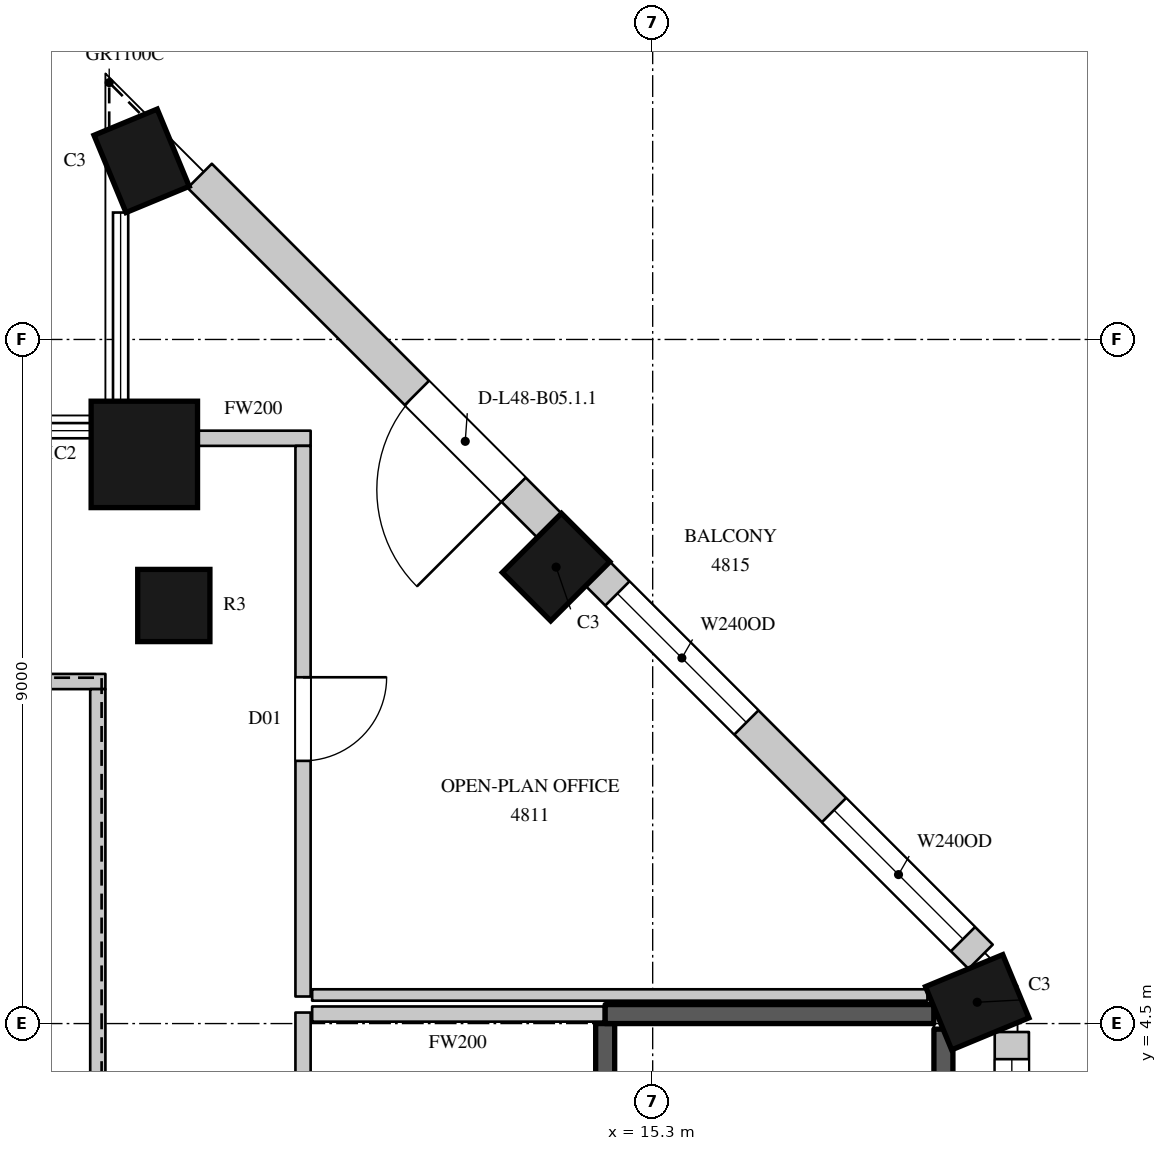
"""IFC4 building model, lengths in metres.
Left out: names, types, materials, properties, quantities, classifications, styles, units other than length and angle.
Written with IfcOpenShell. Run it as: python <this file> out.ifc"""

import sys

from ifc_helpers import new_model, si_unit, direction, frame, frame_2d, origin, origin_2d, place, context, subcontext, project, spatial, rectangle, circle, extrude, element, fill, save


model = new_model("IFC4")
c1 = context("Model", 3, precision=1e-05, world=origin(), true_north=direction((0.0, 1.0)))
c2 = subcontext(c1, "Body", "Model", "MODEL_VIEW")
j1 = project(units=[si_unit("LENGTHUNIT", "METRE"), si_unit("PLANEANGLEUNIT", "RADIAN")], contexts=[c1])
p1 = place(None, origin())
s1 = spatial("IfcSite", under=j1, at=p1, CompositionType="ELEMENT")
p2 = place(p1, origin())
s2 = spatial("IfcBuilding", under=s1, at=p2, CompositionType="ELEMENT")
p3 = place(p2, frame((0.0, 0.0, 217.9)))
s3 = spatial("IfcBuildingStorey", under=s2, at=p3, CompositionType="ELEMENT", Elevation=217.9)
for number, where, z_axis, x_axis in (
    (1, (19.57, 4.78, 0.0), (0.0, 0.0, 1.0), (-0.383, 0.924, 0.0)),
    (2, (14.029, 10.505, 0.0), (0.0, 0.0, 1.0), (-0.707, 0.707, 0.0)),
    (3, (8.576, 15.85, 0.0), (0.0, 0.0, 1.0), (-0.924, -0.383, 0.0)),
):
    element("IfcColumn", number, at=place(p3, frame(where, z_axis=z_axis, x_axis=x_axis)), inside=s3, PredefinedType="COLUMN", context=c2, shape_type="SweptSolid", body=[
        extrude(rectangle(XDim=0.9, YDim=1.1, at=origin_2d()), origin(), (0.0, 0.0, 1.0), 4.1),
    ])
p4 = place(p3, frame((8.612, 11.988, 0.0), z_axis=(0.0, 0.0, 1.0), x_axis=(1.0, 0.0, 0.0)))
e4 = element("IfcColumn", 4, at=p4, inside=s3, PredefinedType="COLUMN", context=c2, shape_type="SweptSolid", body=[
    extrude(circle(Radius=0.7, at=origin_2d()), origin(), (0.0, 0.0, 1.0), 4.1),
])
p5 = place(p3, frame((9.0, 10.0, 0.0), z_axis=(0.0, 0.0, 1.0), x_axis=(1.0, 0.0, 0.0)))
e5 = element("IfcColumn", 5, at=p5, inside=s3, PredefinedType="COLUMN", context=c2, shape_type="SweptSolid", body=[
    extrude(circle(Radius=0.475, at=origin_2d()), origin(), (0.0, 0.0, 1.0), 4.1),
])
p6 = place(p3, frame((20.025, -4.05, 0.0), z_axis=(0.0, 0.0, 1.0), x_axis=(0.0, 1.0, 0.0)))
e6 = element("IfcWall", 6, at=p6, inside=s3, PredefinedType="SOLIDWALL", context=c2, shape_type="SweptSolid", body=[
    extrude(rectangle(XDim=8.439, YDim=0.45, at=frame_2d((4.219, 0.0))), origin(), (0.0, 0.0, 1.0), 3.8),
])
p7 = place(p6, frame((0.394, 0.0, 1.05)))
e7 = element("IfcOpeningElement", 7, at=p7, cuts=e6, PredefinedType="OPENING", context=c2, shape_type="SweptSolid", body=[
    extrude(rectangle(XDim=3.0, YDim=2.4, at=frame_2d((1.5, 1.2))), frame((0.0, 0.235, 0.0), z_axis=(0.0, -1.0, 0.0), x_axis=(1.0, 0.0, 0.0)), (0.0, 0.0, 1.0), 0.47),
])
p8 = place(p6, frame((5.082, 0.0, 1.05)))
e8 = element("IfcOpeningElement", 8, at=p8, cuts=e6, PredefinedType="OPENING", context=c2, shape_type="SweptSolid", body=[
    extrude(rectangle(XDim=3.0, YDim=2.4, at=frame_2d((1.5, 1.2))), frame((0.0, 0.235, 0.0), z_axis=(0.0, -1.0, 0.0), x_axis=(1.0, 0.0, 0.0)), (0.0, 0.0, 1.0), 0.47),
])
p9 = place(p3, frame((19.615, 5.379, 0.0), z_axis=(0.0, 0.0, 1.0), x_axis=(-0.707089646058, 0.7071239159, 0.0)))
e9 = element("IfcWall", 9, at=p9, inside=s3, PredefinedType="SOLIDWALL", context=c2, shape_type="SweptSolid", body=[
    extrude(rectangle(XDim=7.124, YDim=0.45, at=frame_2d((3.562, 0.0))), origin(), (0.0, 0.0, 1.0), 3.8),
])
p10 = place(p9, frame((0.328, 0.0, 1.05)))
e10 = element("IfcOpeningElement", 10, at=p10, cuts=e9, PredefinedType="OPENING", context=c2, shape_type="SweptSolid", body=[
    extrude(rectangle(XDim=2.4, YDim=2.4, at=frame_2d((1.2, 1.2))), frame((0.0, 0.235, 0.0), z_axis=(0.0, -1.0, 0.0), x_axis=(1.0, 0.0, 0.0)), (0.0, 0.0, 1.0), 0.47),
])
p11 = place(p9, frame((4.359, 0.0, 1.05)))
e11 = element("IfcOpeningElement", 11, at=p11, cuts=e9, PredefinedType="OPENING", context=c2, shape_type="SweptSolid", body=[
    extrude(rectangle(XDim=2.4, YDim=2.4, at=frame_2d((1.2, 1.2))), frame((0.0, 0.235, 0.0), z_axis=(0.0, -1.0, 0.0), x_axis=(1.0, 0.0, 0.0)), (0.0, 0.0, 1.0), 0.47),
])
p12 = place(p3, frame((13.941, 11.053, 0.0), z_axis=(0.0, 0.0, 1.0), x_axis=(-0.707106781187, 0.707106781187, 0.0)))
e12 = element("IfcWall", 12, at=p12, inside=s3, PredefinedType="SOLIDWALL", context=c2, shape_type="SweptSolid", body=[
    extrude(rectangle(XDim=6.505, YDim=0.45, at=frame_2d((3.252, 0.0))), origin(), (0.0, 0.0, 1.0), 3.8),
])
p13 = place(p12, frame((0.665, 0.0, 0.0)))
e13 = element("IfcOpeningElement", 13, at=p13, cuts=e12, PredefinedType="OPENING", context=c2, shape_type="SweptSolid", body=[
    extrude(rectangle(XDim=1.8, YDim=2.4, at=frame_2d((0.9, 1.2))), frame((0.0, 0.235, 0.0), z_axis=(0.0, -1.0, 0.0), x_axis=(1.0, 0.0, 0.0)), (0.0, 0.0, 1.0), 0.47),
])
p14 = place(p3, frame((18.65, 7.864, 0.0), z_axis=(0.0, 0.0, 1.0), x_axis=(-0.707059037574, 0.707154521576, 0.0)))
e14 = element("IfcWall", 14, at=p14, inside=s3, PredefinedType="SOLIDWALL", context=c2, shape_type="SweptSolid", body=[
    extrude(rectangle(XDim=2.557, YDim=0.45, at=frame_2d((1.278, 0.0))), origin(), (0.0, 0.0, 1.0), 0.6),
])
p15 = place(p3, frame((-6.1, 9.0, 0.0), z_axis=(0.0, 0.0, 1.0), x_axis=(1.0, 0.0, 0.0)))
e15 = element("IfcWall", 15, at=p15, inside=s3, PredefinedType="PARTITIONING", context=c2, shape_type="SweptSolid", body=[
    extrude(rectangle(XDim=14.2, YDim=0.2, at=frame_2d((7.1, 0.0))), origin(), (0.0, 0.0, 1.0), 3.8),
])
p16 = place(p3, frame((8.0, -4.48, 0.0), z_axis=(0.0, 0.0, 1.0), x_axis=(0.0, 1.0, 0.0)))
e16 = element("IfcWall", 16, at=p16, inside=s3, PredefinedType="PARTITIONING", context=c2, shape_type="SweptSolid", body=[
    extrude(rectangle(XDim=13.38, YDim=0.2, at=frame_2d((6.69, 0.0))), origin(), (0.0, 0.0, 1.0), 3.8),
])
p17 = place(p3, frame((9.296, 12.2, 0.0), z_axis=(0.0, 0.0, 1.0), x_axis=(1.0, 0.0, 0.0)))
e17 = element("IfcWall", 17, at=p17, inside=s3, PredefinedType="PARTITIONING", context=c2, shape_type="SweptSolid", body=[
    extrude(rectangle(XDim=1.504, YDim=0.2, at=frame_2d((0.752, 0.0))), origin(), (0.0, 0.0, 1.0), 3.8),
])
p18 = place(p3, frame((10.7, -11.7, 0.0), z_axis=(0.0, 0.0, 1.0), x_axis=(0.0, 1.0, 0.0)))
e18 = element("IfcWall", 18, at=p18, inside=s3, PredefinedType="PARTITIONING", context=c2, shape_type="SweptSolid", body=[
    extrude(rectangle(XDim=16.345, YDim=0.2, at=frame_2d((8.172, 0.0))), origin(), (0.0, 0.0, 1.0), 3.8),
])
p19 = place(p18, frame((12.35, 0.0, 0.0)))
e19 = element("IfcOpeningElement", 19, at=p19, cuts=e18, PredefinedType="OPENING", context=c2, shape_type="SweptSolid", body=[
    extrude(rectangle(XDim=1.5, YDim=2.4, at=frame_2d((0.75, 1.2))), frame((0.0, 0.11, 0.0), z_axis=(0.0, -1.0, 0.0), x_axis=(1.0, 0.0, 0.0)), (0.0, 0.0, 1.0), 0.22),
])
p20 = place(p18, frame((3.0, 0.0, 0.0)))
e20 = element("IfcOpeningElement", 20, at=p20, cuts=e18, PredefinedType="OPENING", context=c2, shape_type="SweptSolid", body=[
    extrude(rectangle(XDim=1.1, YDim=2.4, at=frame_2d((0.55, 1.2))), frame((0.0, 0.11, 0.0), z_axis=(0.0, -1.0, 0.0), x_axis=(1.0, 0.0, 0.0)), (0.0, 0.0, 1.0), 0.22),
])
p21 = place(p3, frame((10.7, 4.856, 0.0), z_axis=(0.0, 0.0, 1.0), x_axis=(0.0, 1.0, 0.0)))
e21 = element("IfcWall", 21, at=p21, inside=s3, PredefinedType="PARTITIONING", context=c2, shape_type="SweptSolid", body=[
    extrude(rectangle(XDim=7.244, YDim=0.2, at=frame_2d((3.622, 0.0))), origin(), (0.0, 0.0, 1.0), 3.8),
])
p22 = place(p21, frame((3.1, 0.0, 0.0)))
e22 = element("IfcOpeningElement", 22, at=p22, cuts=e21, PredefinedType="OPENING", context=c2, shape_type="SweptSolid", body=[
    extrude(rectangle(XDim=1.1, YDim=2.4, at=frame_2d((0.55, 1.2))), frame((0.0, 0.11, 0.0), z_axis=(0.0, -1.0, 0.0), x_axis=(1.0, 0.0, 0.0)), (0.0, 0.0, 1.0), 0.22),
])
p23 = place(p3, frame((10.82, 4.625, 0.0), z_axis=(0.0, 0.0, 1.0), x_axis=(1.0, 0.0, 0.0)))
e23 = element("IfcWall", 23, at=p23, inside=s3, PredefinedType="PARTITIONING", context=c2, shape_type="SweptSolid", body=[
    extrude(rectangle(XDim=3.835, YDim=0.2, at=frame_2d((1.917, 0.0))), origin(), (0.0, 0.0, 1.0), 3.8),
])
p24 = place(p3, frame((10.82, 4.876, 0.0), z_axis=(0.0, 0.0, 1.0), x_axis=(1.0, 0.0, 0.0)))
e24 = element("IfcWall", 24, at=p24, inside=s3, PredefinedType="PARTITIONING", context=c2, shape_type="SweptSolid", body=[
    extrude(rectangle(XDim=8.095, YDim=0.15, at=frame_2d((4.047, 0.0))), origin(), (0.0, 0.0, 1.0), 3.8),
])
p25 = place(p3, frame((14.675, -4.5, 0.0), z_axis=(0.0, 0.0, 1.0), x_axis=(0.0, 1.0, 0.0)))
e25 = element("IfcWall", 25, at=p25, inside=s3, PredefinedType="SHEAR", context=c2, shape_type="SweptSolid", body=[
    extrude(rectangle(XDim=9.0, YDim=0.25, at=frame_2d((4.5, 0.0))), origin(), (0.0, 0.0, 1.0), 3.8),
])
p26 = place(p25, frame((0.45, 0.0, 0.0)))
e26 = element("IfcOpeningElement", 26, at=p26, cuts=e25, PredefinedType="OPENING", context=c2, shape_type="SweptSolid", body=[
    extrude(rectangle(XDim=1.1, YDim=2.2, at=frame_2d((0.55, 1.1))), frame((0.0, 0.135, 0.0), z_axis=(0.0, -1.0, 0.0), x_axis=(1.0, 0.0, 0.0)), (0.0, 0.0, 1.0), 0.27),
])
p27 = place(p3, frame((14.675, 4.625, 0.0), z_axis=(0.0, 0.0, 1.0), x_axis=(1.0, 0.0, 0.0)))
e27 = element("IfcWall", 27, at=p27, inside=s3, PredefinedType="SHEAR", context=c2, shape_type="SweptSolid", body=[
    extrude(rectangle(XDim=4.324, YDim=0.25, at=frame_2d((2.162, 0.0))), origin(), (0.0, 0.0, 1.0), 3.8),
])
p28 = place(p3, frame((19.125, -4.05, 0.0), z_axis=(0.0, 0.0, 1.0), x_axis=(0.0, 1.0, 0.0)))
e28 = element("IfcWall", 28, at=p28, inside=s3, PredefinedType="SHEAR", context=c2, shape_type="SweptSolid", body=[
    extrude(rectangle(XDim=8.477, YDim=0.25, at=frame_2d((4.238, 0.0))), origin(), (0.0, 0.0, 1.0), 3.8),
])
p29 = place(p8, origin())
e29 = element("IfcWindow", 29, at=p29, inside=s3, PartitioningType="SINGLE_PANEL", PredefinedType="WINDOW", context=c2, shape_type="SweptSolid", body=[
    extrude(rectangle(XDim=3.0, YDim=2.4, at=frame_2d((1.5, 1.2))), frame((0.0, 0.135, 0.0), z_axis=(0.0, -1.0, 0.0), x_axis=(1.0, 0.0, 0.0)), (0.0, 0.0, 1.0), 0.06),
])
fill(e8, e29)
p30 = place(p10, origin())
e30 = element("IfcWindow", 30, at=p30, inside=s3, PartitioningType="SINGLE_PANEL", PredefinedType="WINDOW", context=c2, shape_type="SweptSolid", body=[
    extrude(rectangle(XDim=2.4, YDim=2.4, at=frame_2d((1.2, 1.2))), frame((0.0, 0.135, 0.0), z_axis=(0.0, -1.0, 0.0), x_axis=(1.0, 0.0, 0.0)), (0.0, 0.0, 1.0), 0.06),
])
fill(e10, e30)
p31 = place(p11, origin())
e31 = element("IfcWindow", 31, at=p31, inside=s3, PartitioningType="SINGLE_PANEL", PredefinedType="WINDOW", context=c2, shape_type="SweptSolid", body=[
    extrude(rectangle(XDim=2.4, YDim=2.4, at=frame_2d((1.2, 1.2))), frame((0.0, 0.135, 0.0), z_axis=(0.0, -1.0, 0.0), x_axis=(1.0, 0.0, 0.0)), (0.0, 0.0, 1.0), 0.06),
])
fill(e11, e31)
p32 = place(p13, origin())
e32 = element("IfcDoor", 32, at=p32, inside=s3, OperationType="SLIDING_TO_LEFT", PredefinedType="DOOR", context=c2, shape_type="SweptSolid", body=[
    extrude(rectangle(XDim=1.8, YDim=2.4, at=frame_2d((0.9, 1.2))), frame((0.0, 0.13, 0.0), z_axis=(0.0, -1.0, 0.0), x_axis=(1.0, 0.0, 0.0)), (0.0, 0.0, 1.0), 0.05),
])
fill(e13, e32)
p33 = place(p22, origin())
e33 = element("IfcDoor", 33, at=p33, inside=s3, OperationType="SINGLE_SWING_LEFT", PredefinedType="DOOR", context=c2, shape_type="SweptSolid", body=[
    extrude(rectangle(XDim=1.1, YDim=2.4, at=frame_2d((0.55, 1.2))), frame((0.0, 0.025, 0.0), z_axis=(0.0, -1.0, 0.0), x_axis=(1.0, 0.0, 0.0)), (0.0, 0.0, 1.0), 0.05),
])
fill(e22, e33)
save(model, sys.argv[1])
